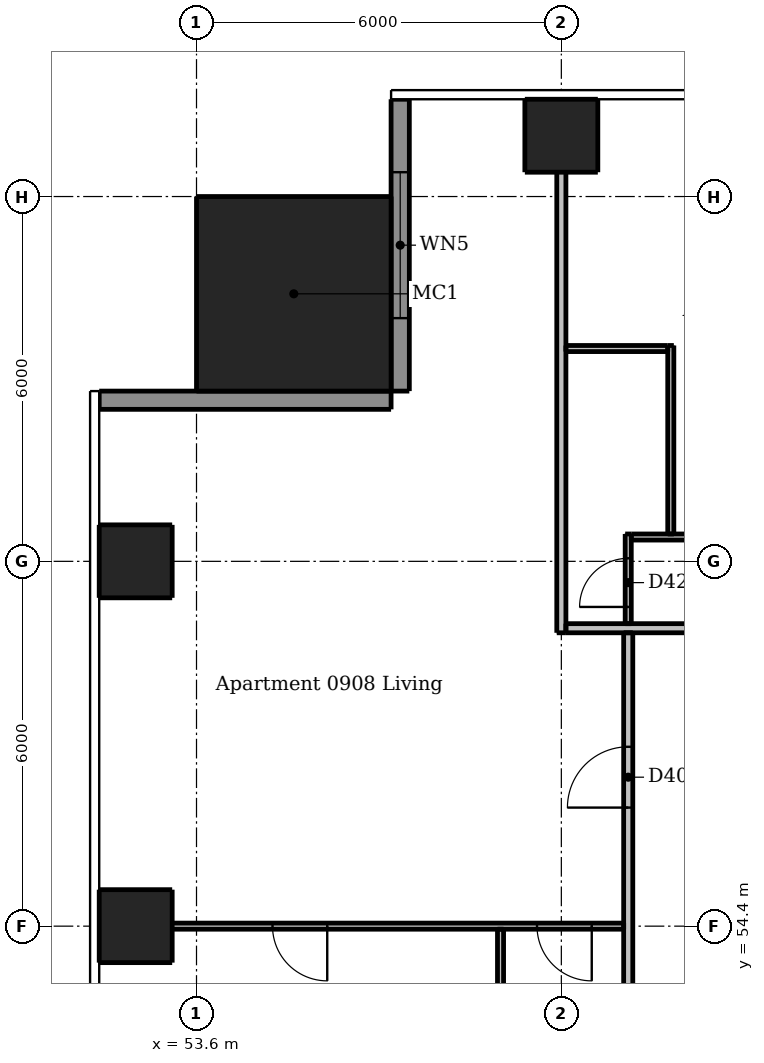
"""IFC4 building model, lengths in metres.
Left out: names, types, materials, properties, quantities, classifications, styles, units other than length and angle.
Written with IfcOpenShell. Run it as: python <this file> out.ifc"""

import sys

from ifc_helpers import new_model, si_unit, direction, frame, frame_2d, origin, origin_2d, place, context, subcontext, project, spatial, rectangle, extrude, element, fill, save


model = new_model("IFC4")
c1 = context("Model", 3, precision=1e-05, world=origin(), true_north=direction((0.0, 1.0)))
c2 = subcontext(c1, "Body", "Model", "MODEL_VIEW")
j1 = project(units=[si_unit("LENGTHUNIT", "METRE"), si_unit("PLANEANGLEUNIT", "RADIAN")], contexts=[c1])
p1 = place(None, origin())
s1 = spatial("IfcSite", under=j1, at=p1, CompositionType="ELEMENT")
p2 = place(p1, origin())
s2 = spatial("IfcBuilding", under=s1, at=p2, CompositionType="ELEMENT")
p3 = place(p2, frame((0.0, 0.0, 36.7)))
s3 = spatial("IfcBuildingStorey", under=s2, at=p3, CompositionType="ELEMENT", Elevation=36.7)
for number, where, z_axis, x_axis in (
    (1, (59.6, 67.4, 0.0), (0.0, 0.0, 1.0), (1.0, 0.0, 0.0)),
    (2, (52.6, 54.4, 0.0), (0.0, 0.0, 1.0), (1.0, 0.0, 0.0)),
    (3, (52.6, 60.4, 0.0), (0.0, 0.0, 1.0), (1.0, 0.0, 0.0)),
):
    element("IfcColumn", number, at=place(p3, frame(where, z_axis=z_axis, x_axis=x_axis)), inside=s3, PredefinedType="COLUMN", context=c2, shape_type="SweptSolid", body=[
        extrude(rectangle(XDim=1.2, YDim=1.2, at=origin_2d()), origin(), (0.0, 0.0, 1.0), 3.05),
    ])
p4 = place(p3, frame((55.2, 64.8, 0.0), z_axis=(0.0, 0.0, 1.0), x_axis=(1.0, 0.0, 0.0)))
e4 = element("IfcColumn", 4, at=p4, inside=s3, PredefinedType="COLUMN", context=c2, shape_type="SweptSolid", body=[
    extrude(rectangle(XDim=3.2, YDim=3.2, at=origin_2d()), origin(), (0.0, 0.0, 1.0), 3.3),
])
p5 = place(p3, frame((56.95, 68.0, 0.0), z_axis=(0.0, 0.0, 1.0), x_axis=(0.0, -1.0, 0.0)))
e5 = element("IfcWall", 5, at=p5, inside=s3, PredefinedType="SOLIDWALL", context=c2, shape_type="SweptSolid", body=[
    extrude(rectangle(XDim=4.8, YDim=0.3, at=frame_2d((2.4, 0.0))), origin(), (0.0, 0.0, 1.0), 3.05),
])
p6 = place(p5, frame((1.2, 0.0, 0.15)))
e6 = element("IfcOpeningElement", 6, at=p6, cuts=e5, PredefinedType="OPENING", context=c2, shape_type="SweptSolid", body=[
    extrude(rectangle(XDim=2.4, YDim=2.1, at=frame_2d((1.2, 1.05))), frame((0.0, 0.16, 0.0), z_axis=(0.0, -1.0, 0.0), x_axis=(1.0, 0.0, 0.0)), (0.0, 0.0, 1.0), 0.32),
])
p7 = place(p3, frame((56.8, 63.05, 0.0), z_axis=(0.0, 0.0, 1.0), x_axis=(-1.0, 0.0, 0.0)))
e7 = element("IfcWall", 7, at=p7, inside=s3, PredefinedType="SOLIDWALL", context=c2, shape_type="SweptSolid", body=[
    extrude(rectangle(XDim=4.8, YDim=0.3, at=frame_2d((2.4, 0.0))), origin(), (0.0, 0.0, 1.0), 3.05),
])
p8 = place(p3, frame((58.6, 54.35, 0.0), z_axis=(0.0, 0.0, 1.0), x_axis=(0.0, -1.0, 0.0)))
e8 = element("IfcWall", 8, at=p8, inside=s3, PredefinedType="PARTITIONING", context=c2, shape_type="SweptSolid", body=[
    extrude(rectangle(XDim=5.875, YDim=0.1, at=frame_2d((2.938, 0.0))), origin(), (0.0, 0.0, 1.0), 3.05),
])
p9 = place(p8, frame((3.75, 0.0, 0.0)))
e9 = element("IfcOpeningElement", 9, at=p9, cuts=e8, PredefinedType="OPENING", context=c2, shape_type="SweptSolid", body=[
    extrude(rectangle(XDim=0.8, YDim=2.1, at=frame_2d((0.4, 1.05))), frame((0.0, 0.06, 0.0), z_axis=(0.0, -1.0, 0.0), x_axis=(1.0, 0.0, 0.0)), (0.0, 0.0, 1.0), 0.12),
])
p10 = place(p3, frame((60.7, 59.375, 0.0), z_axis=(0.0, 0.0, 1.0), x_axis=(0.0, 1.0, 0.0)))
e10 = element("IfcWall", 10, at=p10, inside=s3, PredefinedType="PARTITIONING", context=c2, shape_type="SweptSolid", body=[
    extrude(rectangle(XDim=1.475, YDim=0.1, at=frame_2d((0.738, 0.0))), origin(), (0.0, 0.0, 1.0), 3.05),
])
p11 = place(p10, frame((0.275, 0.0, 0.0)))
e11 = element("IfcOpeningElement", 11, at=p11, cuts=e10, PredefinedType="OPENING", context=c2, shape_type="SweptSolid", body=[
    extrude(rectangle(XDim=0.8, YDim=2.1, at=frame_2d((0.4, 1.05))), frame((0.0, 0.06, 0.0), z_axis=(0.0, -1.0, 0.0), x_axis=(1.0, 0.0, 0.0)), (0.0, 0.0, 1.0), 0.12),
])
p12 = place(p3, frame((61.4, 60.85, 0.0), z_axis=(0.0, 0.0, 1.0), x_axis=(0.0, 1.0, 0.0)))
e12 = element("IfcWall", 12, at=p12, inside=s3, PredefinedType="PARTITIONING", context=c2, shape_type="SweptSolid", body=[
    extrude(rectangle(XDim=3.1, YDim=0.1, at=frame_2d((1.55, 0.0))), origin(), (0.0, 0.0, 1.0), 3.05),
])
p13 = place(p3, frame((59.675, 63.9, 0.0), z_axis=(0.0, 0.0, 1.0), x_axis=(1.0, 0.0, 0.0)))
e13 = element("IfcWall", 13, at=p13, inside=s3, PredefinedType="PARTITIONING", context=c2, shape_type="SweptSolid", body=[
    extrude(rectangle(XDim=1.675, YDim=0.1, at=frame_2d((0.837, 0.0))), origin(), (0.0, 0.0, 1.0), 3.05),
])
p14 = place(p3, frame((60.75, 60.8, 0.0), z_axis=(0.0, 0.0, 1.0), x_axis=(1.0, 0.0, 0.0)))
e14 = element("IfcWall", 14, at=p14, inside=s3, PredefinedType="PARTITIONING", context=c2, shape_type="SweptSolid", body=[
    extrude(rectangle(XDim=16.775, YDim=0.1, at=frame_2d((8.387, 0.0))), origin(), (0.0, 0.0, 1.0), 3.05),
])
p15 = place(p14, frame((3.8, 0.0, 0.0)))
e15 = element("IfcOpeningElement", 15, at=p15, cuts=e14, PredefinedType="OPENING", context=c2, shape_type="SweptSolid", body=[
    extrude(rectangle(XDim=0.9, YDim=2.1, at=frame_2d((0.45, 1.05))), frame((0.0, 0.06, 0.0), z_axis=(0.0, -1.0, 0.0), x_axis=(1.0, 0.0, 0.0)), (0.0, 0.0, 1.0), 0.12),
])
p16 = place(p14, frame((8.9, 0.0, 0.0)))
e16 = element("IfcOpeningElement", 16, at=p16, cuts=e14, PredefinedType="OPENING", context=c2, shape_type="SweptSolid", body=[
    extrude(rectangle(XDim=0.9, YDim=2.1, at=frame_2d((0.45, 1.05))), frame((0.0, 0.06, 0.0), z_axis=(0.0, -1.0, 0.0), x_axis=(1.0, 0.0, 0.0)), (0.0, 0.0, 1.0), 0.12),
])
p17 = place(p14, frame((14.6, 0.0, 0.0)))
e17 = element("IfcOpeningElement", 17, at=p17, cuts=e14, PredefinedType="OPENING", context=c2, shape_type="SweptSolid", body=[
    extrude(rectangle(XDim=0.9, YDim=2.1, at=frame_2d((0.45, 1.05))), frame((0.0, 0.06, 0.0), z_axis=(0.0, -1.0, 0.0), x_axis=(1.0, 0.0, 0.0)), (0.0, 0.0, 1.0), 0.12),
])
p18 = place(p14, frame((11.65, 0.0, 0.0)))
e18 = element("IfcOpeningElement", 18, at=p18, cuts=e14, PredefinedType="OPENING", context=c2, shape_type="SweptSolid", body=[
    extrude(rectangle(XDim=0.8, YDim=2.1, at=frame_2d((0.4, 1.05))), frame((0.0, 0.06, 0.0), z_axis=(0.0, -1.0, 0.0), x_axis=(1.0, 0.0, 0.0)), (0.0, 0.0, 1.0), 0.12),
])
p19 = place(p3, frame((60.625, 54.4, 0.0), z_axis=(0.0, 0.0, 1.0), x_axis=(-1.0, 0.0, 0.0)))
e19 = element("IfcWall", 19, at=p19, inside=s3, PredefinedType="PARTITIONING", context=c2, shape_type="SweptSolid", body=[
    extrude(rectangle(XDim=8.625, YDim=0.1, at=frame_2d((4.312, 0.0))), origin(), (0.0, 0.0, 1.0), 2.516),
])
p20 = place(p19, frame((0.525, 0.0, 0.0)))
e20 = element("IfcOpeningElement", 20, at=p20, cuts=e19, PredefinedType="OPENING", context=c2, shape_type="SweptSolid", body=[
    extrude(rectangle(XDim=0.9, YDim=2.1, at=frame_2d((0.45, 1.05))), frame((0.0, 0.06, 0.0), z_axis=(0.0, -1.0, 0.0), x_axis=(1.0, 0.0, 0.0)), (0.0, 0.0, 1.0), 0.12),
])
p21 = place(p19, frame((4.875, 0.0, 0.0)))
e21 = element("IfcOpeningElement", 21, at=p21, cuts=e19, PredefinedType="OPENING", context=c2, shape_type="SweptSolid", body=[
    extrude(rectangle(XDim=0.9, YDim=2.1, at=frame_2d((0.45, 1.05))), frame((0.0, 0.06, 0.0), z_axis=(0.0, -1.0, 0.0), x_axis=(1.0, 0.0, 0.0)), (0.0, 0.0, 1.0), 0.12),
])
p22 = place(p3, frame((59.6, 59.225, 0.0), z_axis=(0.0, 0.0, 1.0), x_axis=(0.0, 1.0, 0.0)))
e22 = element("IfcWall", 22, at=p22, inside=s3, PredefinedType="PARTITIONING", context=c2, shape_type="SweptSolid", body=[
    extrude(rectangle(XDim=8.775, YDim=0.15, at=frame_2d((4.387, 0.0))), origin(), (0.0, 0.0, 1.0), 2.51),
])
p23 = place(p3, frame((60.7, 30.325, 0.0), z_axis=(0.0, 0.0, 1.0), x_axis=(0.0, 1.0, 0.0)))
e23 = element("IfcWall", 23, at=p23, inside=s3, PredefinedType="PARTITIONING", context=c2, shape_type="SweptSolid", body=[
    extrude(rectangle(XDim=28.9, YDim=0.15, at=frame_2d((14.45, 0.0))), origin(), (0.0, 0.0, 1.0), 3.05),
])
p24 = place(p23, frame((9.225, 0.0, 0.0)))
e24 = element("IfcOpeningElement", 24, at=p24, cuts=e23, PredefinedType="OPENING", context=c2, shape_type="SweptSolid", body=[
    extrude(rectangle(XDim=1.0, YDim=2.1, at=frame_2d((0.5, 1.05))), frame((0.0, 0.085, 0.0), z_axis=(0.0, -1.0, 0.0), x_axis=(1.0, 0.0, 0.0)), (0.0, 0.0, 1.0), 0.17),
])
p25 = place(p23, frame((26.025, 0.0, 0.0)))
e25 = element("IfcOpeningElement", 25, at=p25, cuts=e23, PredefinedType="OPENING", context=c2, shape_type="SweptSolid", body=[
    extrude(rectangle(XDim=1.0, YDim=2.1, at=frame_2d((0.5, 1.05))), frame((0.0, 0.085, 0.0), z_axis=(0.0, -1.0, 0.0), x_axis=(1.0, 0.0, 0.0)), (0.0, 0.0, 1.0), 0.17),
])
p26 = place(p3, frame((59.675, 59.3, 0.0), z_axis=(0.0, 0.0, 1.0), x_axis=(1.0, 0.0, 0.0)))
e26 = element("IfcWall", 26, at=p26, inside=s3, PredefinedType="PARTITIONING", context=c2, shape_type="SweptSolid", body=[
    extrude(rectangle(XDim=28.55, YDim=0.15, at=frame_2d((14.275, 0.0))), origin(), (0.0, 0.0, 1.0), 3.05),
])
p27 = place(p26, frame((8.975, 0.0, 0.0)))
e27 = element("IfcOpeningElement", 27, at=p27, cuts=e26, PredefinedType="OPENING", context=c2, shape_type="SweptSolid", body=[
    extrude(rectangle(XDim=1.0, YDim=2.1, at=frame_2d((0.5, 1.05))), frame((0.0, 0.085, 0.0), z_axis=(0.0, -1.0, 0.0), x_axis=(1.0, 0.0, 0.0)), (0.0, 0.0, 1.0), 0.17),
])
p28 = place(p26, frame((25.775, 0.0, 0.0)))
e28 = element("IfcOpeningElement", 28, at=p28, cuts=e26, PredefinedType="OPENING", context=c2, shape_type="SweptSolid", body=[
    extrude(rectangle(XDim=1.0, YDim=2.1, at=frame_2d((0.5, 1.05))), frame((0.0, 0.085, 0.0), z_axis=(0.0, -1.0, 0.0), x_axis=(1.0, 0.0, 0.0)), (0.0, 0.0, 1.0), 0.17),
])
p29 = place(p6, origin())
e29 = element("IfcWindow", 29, at=p29, inside=s3, PartitioningType="DOUBLE_PANEL_VERTICAL", PredefinedType="WINDOW", context=c2, shape_type="SweptSolid", body=[
    extrude(rectangle(XDim=2.4, YDim=2.1, at=frame_2d((1.2, 1.05))), frame((0.0, 0.03, 0.0), z_axis=(0.0, -1.0, 0.0), x_axis=(1.0, 0.0, 0.0)), (0.0, 0.0, 1.0), 0.06),
])
fill(e6, e29)
p30 = place(p11, origin())
e30 = element("IfcDoor", 30, at=p30, inside=s3, OperationType="SINGLE_SWING_LEFT", PredefinedType="DOOR", context=c2, shape_type="SweptSolid", body=[
    extrude(rectangle(XDim=0.8, YDim=2.1, at=frame_2d((0.4, 1.05))), frame((0.0, 0.025, 0.0), z_axis=(0.0, -1.0, 0.0), x_axis=(1.0, 0.0, 0.0)), (0.0, 0.0, 1.0), 0.05),
])
fill(e11, e30)
p31 = place(p25, origin())
e31 = element("IfcDoor", 31, at=p31, inside=s3, OperationType="SINGLE_SWING_LEFT", PredefinedType="DOOR", context=c2, shape_type="SweptSolid", body=[
    extrude(rectangle(XDim=1.0, YDim=2.1, at=frame_2d((0.5, 1.05))), frame((0.0, 0.025, 0.0), z_axis=(0.0, -1.0, 0.0), x_axis=(1.0, 0.0, 0.0)), (0.0, 0.0, 1.0), 0.05),
])
fill(e25, e31)
p32 = place(p20, origin())
e32 = element("IfcDoor", 32, at=p32, inside=s3, OperationType="SINGLE_SWING_LEFT", PredefinedType="DOOR", context=c2, shape_type="SweptSolid", body=[
    extrude(rectangle(XDim=0.9, YDim=2.1, at=frame_2d((0.45, 1.05))), frame((0.0, 0.025, 0.0), z_axis=(0.0, -1.0, 0.0), x_axis=(1.0, 0.0, 0.0)), (0.0, 0.0, 1.0), 0.05),
])
fill(e20, e32)
p33 = place(p21, origin())
e33 = element("IfcDoor", 33, at=p33, inside=s3, OperationType="SINGLE_SWING_LEFT", PredefinedType="DOOR", context=c2, shape_type="SweptSolid", body=[
    extrude(rectangle(XDim=0.9, YDim=2.1, at=frame_2d((0.45, 1.05))), frame((0.0, 0.025, 0.0), z_axis=(0.0, -1.0, 0.0), x_axis=(1.0, 0.0, 0.0)), (0.0, 0.0, 1.0), 0.05),
])
fill(e21, e33)
save(model, sys.argv[1])
